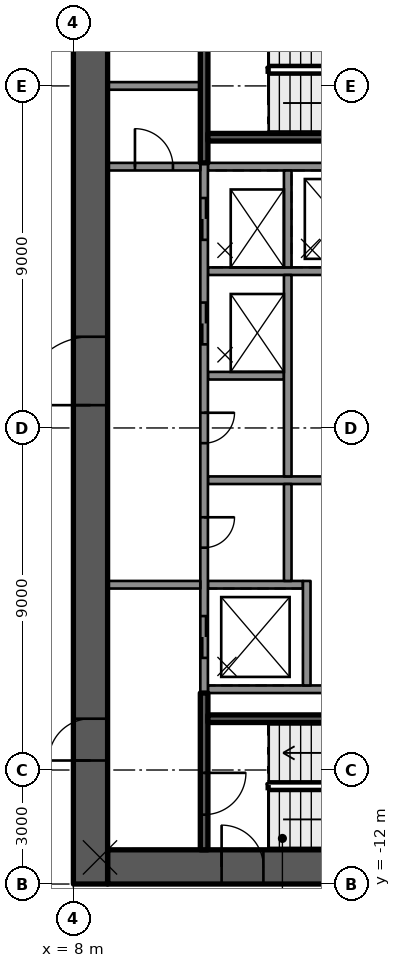
"""IFC4 building model, lengths in metres.
Left out: names, types, materials, properties, quantities, classifications, styles, units other than length and angle.
Written with IfcOpenShell. Run it as: python <this file> out.ifc"""

import sys

from ifc_helpers import new_model, si_unit, direction, frame, frame_2d, origin, place, context, subcontext, project, spatial, rectangle, extrude, element, fill, save


model = new_model("IFC4")
c1 = context("Model", 3, precision=1e-05, world=origin(), true_north=direction((0.0, 1.0)))
c2 = subcontext(c1, "Body", "Model", "MODEL_VIEW")
j1 = project(units=[si_unit("LENGTHUNIT", "METRE"), si_unit("PLANEANGLEUNIT", "RADIAN")], contexts=[c1])
p1 = place(None, origin())
s1 = spatial("IfcSite", under=j1, at=p1, CompositionType="ELEMENT")
p2 = place(p1, origin())
s2 = spatial("IfcBuilding", under=s1, at=p2, CompositionType="ELEMENT")
p3 = place(p2, frame((0.0, 0.0, 221.0)))
s3 = spatial("IfcBuildingStorey", under=s2, at=p3, CompositionType="ELEMENT", Elevation=221.0)
p4 = place(p3, frame((8.9, -11.55, 0.0), z_axis=(0.0, 0.0, 1.0), x_axis=(1.0, 0.0, 0.0)))
e1 = element("IfcWall", 1, at=p4, inside=s3, PredefinedType="SHEAR", context=c2, shape_type="SweptSolid", body=[
    extrude(rectangle(XDim=9.2, YDim=0.9, at=frame_2d((4.6, 0.0))), origin(), (0.0, 0.0, 1.0), 3.5),
])
p5 = place(p4, frame((3.0, 0.0, 0.0)))
e2 = element("IfcOpeningElement", 2, at=p5, cuts=e1, PredefinedType="OPENING", context=c2, shape_type="SweptSolid", body=[
    extrude(rectangle(XDim=1.1, YDim=2.1, at=frame_2d((0.55, 1.05))), frame((0.0, 0.46, 0.0), z_axis=(0.0, -1.0, 0.0), x_axis=(1.0, 0.0, 0.0)), (0.0, 0.0, 1.0), 0.92),
])
p6 = place(p3, frame((8.45, -12.0, 0.0), z_axis=(0.0, 0.0, 1.0), x_axis=(0.0, 1.0, 0.0)))
e3 = element("IfcWall", 3, at=p6, inside=s3, PredefinedType="SHEAR", context=c2, shape_type="SweptSolid", body=[
    extrude(rectangle(XDim=24.0, YDim=0.9, at=frame_2d((12.0, 0.0))), origin(), (0.0, 0.0, 1.0), 3.5),
])
p7 = place(p6, frame((12.6, 0.0, 0.0)))
e4 = element("IfcOpeningElement", 4, at=p7, cuts=e3, PredefinedType="OPENING", context=c2, shape_type="SweptSolid", body=[
    extrude(rectangle(XDim=1.8, YDim=2.1, at=frame_2d((0.9, 1.05))), frame((0.0, 0.46, 0.0), z_axis=(0.0, -1.0, 0.0), x_axis=(1.0, 0.0, 0.0)), (0.0, 0.0, 1.0), 0.92),
])
p8 = place(p6, frame((3.25, 0.0, 0.0)))
e5 = element("IfcOpeningElement", 5, at=p8, cuts=e3, PredefinedType="OPENING", context=c2, shape_type="SweptSolid", body=[
    extrude(rectangle(XDim=1.1, YDim=2.1, at=frame_2d((0.55, 1.05))), frame((0.0, 0.46, 0.0), z_axis=(0.0, -1.0, 0.0), x_axis=(1.0, 0.0, 0.0)), (0.0, 0.0, 1.0), 0.92),
])
for number, where, z_axis, x_axis in (
    (6, (11.54, -6.875, 0.0), (0.0, 0.0, 1.0), (1.0, 0.0, 0.0)),
    (7, (11.54, 6.875, 0.0), (0.0, 0.0, 1.0), (1.0, 0.0, 0.0)),
):
    element("IfcWall", number, at=place(p3, frame(where, z_axis=z_axis, x_axis=x_axis)), inside=s3, PredefinedType="SOLIDWALL", context=c2, shape_type="SweptSolid", body=[
        extrude(rectangle(XDim=6.56, YDim=0.2, at=frame_2d((3.28, 0.0))), origin(), (0.0, 0.0, 1.0), 3.08),
    ])
p9 = place(p3, frame((11.54, 4.125, 0.0), z_axis=(0.0, 0.0, 1.0), x_axis=(1.0, 0.0, 0.0)))
e8 = element("IfcWall", 8, at=p9, inside=s3, PredefinedType="SOLIDWALL", context=c2, shape_type="SweptSolid", body=[
    extrude(rectangle(XDim=4.7, YDim=0.2, at=frame_2d((2.35, 0.0))), origin(), (0.0, 0.0, 1.0), 3.08),
])
p10 = place(p3, frame((11.54, 1.375, 0.0), z_axis=(0.0, 0.0, 1.0), x_axis=(1.0, 0.0, 0.0)))
e9 = element("IfcWall", 9, at=p10, inside=s3, PredefinedType="SOLIDWALL", context=c2, shape_type="SweptSolid", body=[
    extrude(rectangle(XDim=2.0, YDim=0.2, at=frame_2d((1.0, 0.0))), origin(), (0.0, 0.0, 1.0), 3.08),
])
p11 = place(p3, frame((11.54, -1.375, 0.0), z_axis=(0.0, 0.0, 1.0), x_axis=(1.0, 0.0, 0.0)))
e10 = element("IfcWall", 10, at=p11, inside=s3, PredefinedType="SOLIDWALL", context=c2, shape_type="SweptSolid", body=[
    extrude(rectangle(XDim=4.2, YDim=0.2, at=frame_2d((2.1, 0.0))), origin(), (0.0, 0.0, 1.0), 3.08),
])
p12 = place(p3, frame((11.54, -4.125, 0.0), z_axis=(0.0, 0.0, 1.0), x_axis=(1.0, 0.0, 0.0)))
e11 = element("IfcWall", 11, at=p12, inside=s3, PredefinedType="SOLIDWALL", context=c2, shape_type="SweptSolid", body=[
    extrude(rectangle(XDim=2.5, YDim=0.2, at=frame_2d((1.25, 0.0))), origin(), (0.0, 0.0, 1.0), 3.08),
])
p13 = place(p3, frame((11.44, 6.975, 0.0), z_axis=(0.0, 0.0, 1.0), x_axis=(0.0, -1.0, 0.0)))
e12 = element("IfcWall", 12, at=p13, inside=s3, PredefinedType="SOLIDWALL", context=c2, shape_type="SweptSolid", body=[
    extrude(rectangle(XDim=13.95, YDim=0.2, at=frame_2d((6.975, 0.0))), origin(), (0.0, 0.0, 1.0), 3.08),
])
p14 = place(p13, frame((0.925, 0.0, 0.0)))
e13 = element("IfcOpeningElement", 13, at=p14, cuts=e12, PredefinedType="OPENING", context=c2, shape_type="SweptSolid", body=[
    extrude(rectangle(XDim=1.1, YDim=2.1, at=frame_2d((0.55, 1.05))), frame((0.0, 0.11, 0.0), z_axis=(0.0, -1.0, 0.0), x_axis=(1.0, 0.0, 0.0)), (0.0, 0.0, 1.0), 0.22),
])
p15 = place(p13, frame((3.675, 0.0, 0.0)))
e14 = element("IfcOpeningElement", 14, at=p15, cuts=e12, PredefinedType="OPENING", context=c2, shape_type="SweptSolid", body=[
    extrude(rectangle(XDim=1.1, YDim=2.1, at=frame_2d((0.55, 1.05))), frame((0.0, 0.11, 0.0), z_axis=(0.0, -1.0, 0.0), x_axis=(1.0, 0.0, 0.0)), (0.0, 0.0, 1.0), 0.22),
])
p16 = place(p13, frame((11.925, 0.0, 0.0)))
e15 = element("IfcOpeningElement", 15, at=p16, cuts=e12, PredefinedType="OPENING", context=c2, shape_type="SweptSolid", body=[
    extrude(rectangle(XDim=1.1, YDim=2.1, at=frame_2d((0.55, 1.05))), frame((0.0, 0.11, 0.0), z_axis=(0.0, -1.0, 0.0), x_axis=(1.0, 0.0, 0.0)), (0.0, 0.0, 1.0), 0.22),
])
p17 = place(p13, frame((6.575, 0.0, 0.0)))
e16 = element("IfcOpeningElement", 16, at=p17, cuts=e12, PredefinedType="OPENING", context=c2, shape_type="SweptSolid", body=[
    extrude(rectangle(XDim=0.8, YDim=2.1, at=frame_2d((0.4, 1.05))), frame((0.0, 0.11, 0.0), z_axis=(0.0, -1.0, 0.0), x_axis=(1.0, 0.0, 0.0)), (0.0, 0.0, 1.0), 0.22),
])
p18 = place(p13, frame((9.325, 0.0, 0.0)))
e17 = element("IfcOpeningElement", 17, at=p18, cuts=e12, PredefinedType="OPENING", context=c2, shape_type="SweptSolid", body=[
    extrude(rectangle(XDim=0.8, YDim=2.1, at=frame_2d((0.4, 1.05))), frame((0.0, 0.11, 0.0), z_axis=(0.0, -1.0, 0.0), x_axis=(1.0, 0.0, 0.0)), (0.0, 0.0, 1.0), 0.22),
])
p19 = place(p3, frame((13.64, 6.775, 0.0), z_axis=(0.0, 0.0, 1.0), x_axis=(0.0, -1.0, 0.0)))
e18 = element("IfcWall", 18, at=p19, inside=s3, PredefinedType="SOLIDWALL", context=c2, shape_type="SweptSolid", body=[
    extrude(rectangle(XDim=2.55, YDim=0.2, at=frame_2d((1.275, 0.0))), origin(), (0.0, 0.0, 1.0), 3.08),
])
p20 = place(p3, frame((13.64, 4.025, 0.0), z_axis=(0.0, 0.0, 1.0), x_axis=(0.0, -1.0, 0.0)))
e19 = element("IfcWall", 19, at=p20, inside=s3, PredefinedType="SOLIDWALL", context=c2, shape_type="SweptSolid", body=[
    extrude(rectangle(XDim=5.3, YDim=0.2, at=frame_2d((2.65, 0.0))), origin(), (0.0, 0.0, 1.0), 3.08),
])
p21 = place(p3, frame((13.64, -1.475, 0.0), z_axis=(0.0, 0.0, 1.0), x_axis=(0.0, -1.0, 0.0)))
e20 = element("IfcWall", 20, at=p21, inside=s3, PredefinedType="SOLIDWALL", context=c2, shape_type="SweptSolid", body=[
    extrude(rectangle(XDim=2.55, YDim=0.2, at=frame_2d((1.275, 0.0))), origin(), (0.0, 0.0, 1.0), 3.08),
])
p22 = place(p3, frame((14.14, -4.025, 0.0), z_axis=(0.0, 0.0, 1.0), x_axis=(0.0, -1.0, 0.0)))
e21 = element("IfcWall", 21, at=p22, inside=s3, PredefinedType="SOLIDWALL", context=c2, shape_type="SweptSolid", body=[
    extrude(rectangle(XDim=2.75, YDim=0.2, at=frame_2d((1.375, 0.0))), origin(), (0.0, 0.0, 1.0), 3.08),
])
p23 = place(p3, frame((11.44, -6.975, 0.0), z_axis=(0.0, 0.0, 1.0), x_axis=(0.0, -1.0, 0.0)))
e22 = element("IfcWall", 22, at=p23, inside=s3, PredefinedType="SOLIDWALL", context=c2, shape_type="SweptSolid", body=[
    extrude(rectangle(XDim=4.125, YDim=0.2, at=frame_2d((2.062, 0.0))), origin(), (0.0, 0.0, 1.0), 3.08),
])
p24 = place(p23, frame((2.1, 0.0, 0.0)))
e23 = element("IfcOpeningElement", 23, at=p24, cuts=e22, PredefinedType="OPENING", context=c2, shape_type="SweptSolid", body=[
    extrude(rectangle(XDim=1.1, YDim=2.1, at=frame_2d((0.55, 1.05))), frame((0.0, 0.11, 0.0), z_axis=(0.0, -1.0, 0.0), x_axis=(1.0, 0.0, 0.0)), (0.0, 0.0, 1.0), 0.22),
])
p25 = place(p3, frame((11.54, -7.65, 0.0), z_axis=(0.0, 0.0, 1.0), x_axis=(1.0, 0.0, 0.0)))
e24 = element("IfcWall", 24, at=p25, inside=s3, PredefinedType="SOLIDWALL", context=c2, shape_type="SweptSolid", body=[
    extrude(rectangle(XDim=6.56, YDim=0.2, at=frame_2d((3.28, 0.0))), origin(), (0.0, 0.0, 1.0), 3.08),
])
p26 = place(p3, frame((11.44, 11.1, 0.0), z_axis=(0.0, 0.0, 1.0), x_axis=(0.0, -1.0, 0.0)))
e25 = element("IfcWall", 25, at=p26, inside=s3, PredefinedType="SOLIDWALL", context=c2, shape_type="SweptSolid", body=[
    extrude(rectangle(XDim=4.125, YDim=0.2, at=frame_2d((2.062, 0.0))), origin(), (0.0, 0.0, 1.0), 3.08),
])
p27 = place(p3, frame((11.54, 7.65, 0.0), z_axis=(0.0, 0.0, 1.0), x_axis=(1.0, 0.0, 0.0)))
e26 = element("IfcWall", 26, at=p27, inside=s3, PredefinedType="SOLIDWALL", context=c2, shape_type="SweptSolid", body=[
    extrude(rectangle(XDim=6.56, YDim=0.2, at=frame_2d((3.28, 0.0))), origin(), (0.0, 0.0, 1.0), 3.08),
])
p28 = place(p3, frame((8.9, -4.125, 0.0), z_axis=(0.0, 0.0, 1.0), x_axis=(1.0, 0.0, 0.0)))
e27 = element("IfcWall", 27, at=p28, inside=s3, PredefinedType="PARTITIONING", context=c2, shape_type="SweptSolid", body=[
    extrude(rectangle(XDim=2.44, YDim=0.2, at=frame_2d((1.22, 0.0))), origin(), (0.0, 0.0, 1.0), 3.08),
])
p29 = place(p3, frame((8.9, 6.875, 0.0), z_axis=(0.0, 0.0, 1.0), x_axis=(1.0, 0.0, 0.0)))
e28 = element("IfcWall", 28, at=p29, inside=s3, PredefinedType="PARTITIONING", context=c2, shape_type="SweptSolid", body=[
    extrude(rectangle(XDim=2.44, YDim=0.2, at=frame_2d((1.22, 0.0))), origin(), (0.0, 0.0, 1.0), 3.08),
])
p30 = place(p29, frame((0.72, 0.0, 0.0)))
e29 = element("IfcOpeningElement", 29, at=p30, cuts=e28, PredefinedType="OPENING", context=c2, shape_type="SweptSolid", body=[
    extrude(rectangle(XDim=1.0, YDim=2.1, at=frame_2d((0.5, 1.05))), frame((0.0, 0.11, 0.0), z_axis=(0.0, -1.0, 0.0), x_axis=(1.0, 0.0, 0.0)), (0.0, 0.0, 1.0), 0.22),
])
p31 = place(p3, frame((8.9, 9.0, 0.0), z_axis=(0.0, 0.0, 1.0), x_axis=(1.0, 0.0, 0.0)))
e30 = element("IfcWall", 30, at=p31, inside=s3, PredefinedType="PARTITIONING", context=c2, shape_type="SweptSolid", body=[
    extrude(rectangle(XDim=2.44, YDim=0.2, at=frame_2d((1.22, 0.0))), origin(), (0.0, 0.0, 1.0), 3.08),
])
p32 = place(p14, origin())
e31 = element("IfcDoor", 31, at=p32, inside=s3, OperationType="DOUBLE_DOOR_SLIDING", PredefinedType="DOOR", context=c2, shape_type="SweptSolid", body=[
    extrude(rectangle(XDim=1.1, YDim=2.1, at=frame_2d((0.55, 1.05))), frame((0.0, 0.025, 0.0), z_axis=(0.0, -1.0, 0.0), x_axis=(1.0, 0.0, 0.0)), (0.0, 0.0, 1.0), 0.05),
])
fill(e13, e31)
p33 = place(p15, origin())
e32 = element("IfcDoor", 32, at=p33, inside=s3, OperationType="DOUBLE_DOOR_SLIDING", PredefinedType="DOOR", context=c2, shape_type="SweptSolid", body=[
    extrude(rectangle(XDim=1.1, YDim=2.1, at=frame_2d((0.55, 1.05))), frame((0.0, 0.025, 0.0), z_axis=(0.0, -1.0, 0.0), x_axis=(1.0, 0.0, 0.0)), (0.0, 0.0, 1.0), 0.05),
])
fill(e14, e32)
p34 = place(p16, origin())
e33 = element("IfcDoor", 33, at=p34, inside=s3, OperationType="DOUBLE_DOOR_SLIDING", PredefinedType="DOOR", context=c2, shape_type="SweptSolid", body=[
    extrude(rectangle(XDim=1.1, YDim=2.1, at=frame_2d((0.55, 1.05))), frame((0.0, 0.025, 0.0), z_axis=(0.0, -1.0, 0.0), x_axis=(1.0, 0.0, 0.0)), (0.0, 0.0, 1.0), 0.05),
])
fill(e15, e33)
p35 = place(p17, origin())
e34 = element("IfcDoor", 34, at=p35, inside=s3, OperationType="SINGLE_SWING_LEFT", PredefinedType="DOOR", context=c2, shape_type="SweptSolid", body=[
    extrude(rectangle(XDim=0.8, YDim=2.1, at=frame_2d((0.4, 1.05))), frame((0.0, 0.025, 0.0), z_axis=(0.0, -1.0, 0.0), x_axis=(1.0, 0.0, 0.0)), (0.0, 0.0, 1.0), 0.05),
])
fill(e16, e34)
p36 = place(p18, origin())
e35 = element("IfcDoor", 35, at=p36, inside=s3, OperationType="SINGLE_SWING_LEFT", PredefinedType="DOOR", context=c2, shape_type="SweptSolid", body=[
    extrude(rectangle(XDim=0.8, YDim=2.1, at=frame_2d((0.4, 1.05))), frame((0.0, 0.025, 0.0), z_axis=(0.0, -1.0, 0.0), x_axis=(1.0, 0.0, 0.0)), (0.0, 0.0, 1.0), 0.05),
])
fill(e17, e35)
p37 = place(p7, origin())
e36 = element("IfcDoor", 36, at=p37, inside=s3, OperationType="SINGLE_SWING_RIGHT", PredefinedType="DOOR", context=c2, shape_type="SweptSolid", body=[
    extrude(rectangle(XDim=1.8, YDim=2.1, at=frame_2d((0.9, 1.05))), frame((0.0, 0.025, 0.0), z_axis=(0.0, -1.0, 0.0), x_axis=(1.0, 0.0, 0.0)), (0.0, 0.0, 1.0), 0.05),
])
fill(e4, e36)
p38 = place(p8, origin())
e37 = element("IfcDoor", 37, at=p38, inside=s3, OperationType="SINGLE_SWING_LEFT", PredefinedType="DOOR", context=c2, shape_type="SweptSolid", body=[
    extrude(rectangle(XDim=1.1, YDim=2.1, at=frame_2d((0.55, 1.05))), frame((0.0, 0.025, 0.0), z_axis=(0.0, -1.0, 0.0), x_axis=(1.0, 0.0, 0.0)), (0.0, 0.0, 1.0), 0.05),
])
fill(e5, e37)
p39 = place(p5, origin())
e38 = element("IfcDoor", 38, at=p39, inside=s3, OperationType="SINGLE_SWING_LEFT", PredefinedType="DOOR", context=c2, shape_type="SweptSolid", body=[
    extrude(rectangle(XDim=1.1, YDim=2.1, at=frame_2d((0.55, 1.05))), frame((0.0, 0.025, 0.0), z_axis=(0.0, -1.0, 0.0), x_axis=(1.0, 0.0, 0.0)), (0.0, 0.0, 1.0), 0.05),
])
fill(e2, e38)
p40 = place(p24, origin())
e39 = element("IfcDoor", 39, at=p40, inside=s3, OperationType="SINGLE_SWING_RIGHT", PredefinedType="DOOR", context=c2, shape_type="SweptSolid", body=[
    extrude(rectangle(XDim=1.1, YDim=2.1, at=frame_2d((0.55, 1.05))), frame((0.0, 0.025, 0.0), z_axis=(0.0, -1.0, 0.0), x_axis=(1.0, 0.0, 0.0)), (0.0, 0.0, 1.0), 0.05),
])
fill(e23, e39)
p41 = place(p30, origin())
e40 = element("IfcDoor", 40, at=p41, inside=s3, OperationType="SINGLE_SWING_RIGHT", PredefinedType="DOOR", context=c2, shape_type="SweptSolid", body=[
    extrude(rectangle(XDim=1.0, YDim=2.1, at=frame_2d((0.5, 1.05))), frame((0.0, 0.025, 0.0), z_axis=(0.0, -1.0, 0.0), x_axis=(1.0, 0.0, 0.0)), (0.0, 0.0, 1.0), 0.05),
])
fill(e29, e40)
save(model, sys.argv[1])
